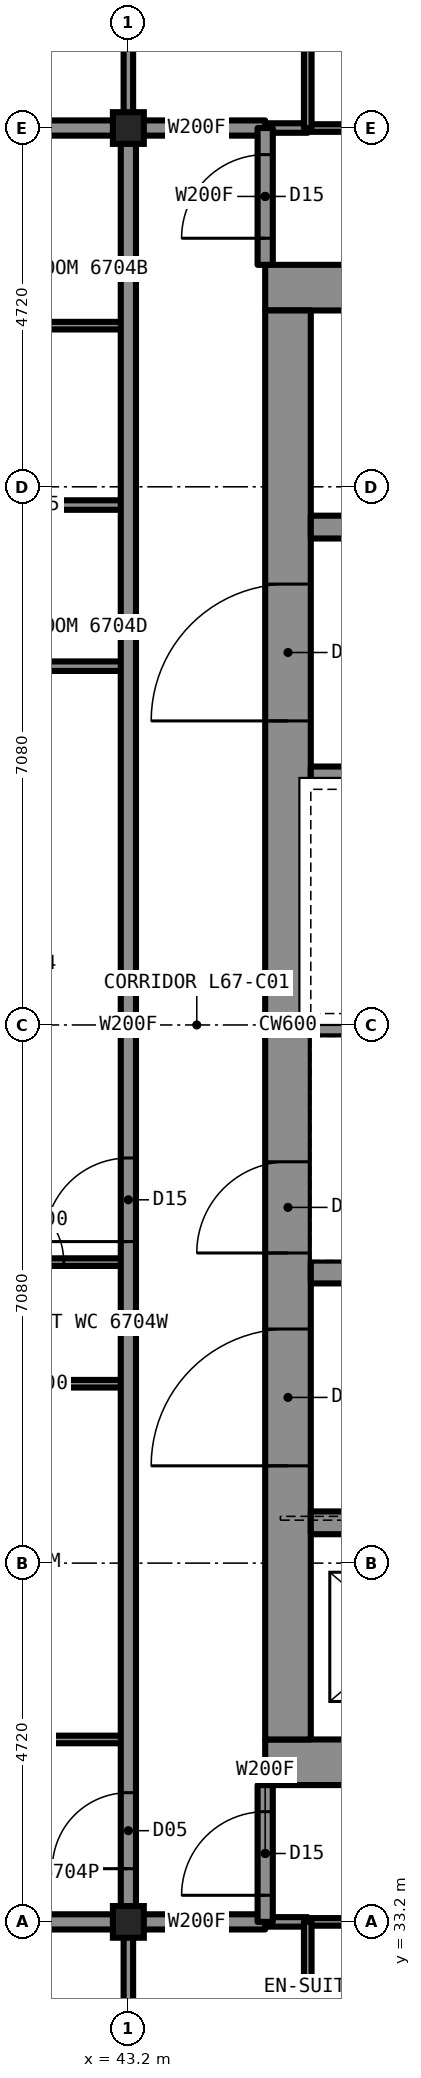
"""IFC4 building model, lengths in metres.
Left out: names, types, materials, properties, quantities, classifications, styles, units other than length and angle.
Written with IfcOpenShell. Run it as: python <this file> out.ifc"""

import sys

from ifc_helpers import new_model, si_unit, direction, frame, frame_2d, origin, origin_2d, place, context, subcontext, project, spatial, rectangle, i_section, extrude, element, fill, save


model = new_model("IFC4")
c1 = context("Model", 3, precision=1e-05, world=origin(), true_north=direction((0.0, 1.0)))
c2 = subcontext(c1, "Body", "Model", "MODEL_VIEW")
j1 = project(units=[si_unit("LENGTHUNIT", "METRE"), si_unit("PLANEANGLEUNIT", "RADIAN")], contexts=[c1])
p1 = place(None, origin())
s1 = spatial("IfcSite", under=j1, at=p1, CompositionType="ELEMENT")
p2 = place(p1, origin())
s2 = spatial("IfcBuilding", under=s1, at=p2, CompositionType="ELEMENT")
p3 = place(p2, frame((0.0, 0.0, 247.7)))
s3 = spatial("IfcBuildingStorey", under=s2, at=p3, CompositionType="ELEMENT", Elevation=247.7)
for number, where, z_axis, x_axis in (
    (1, (43.2, 33.2, 0.0), (0.0, 0.0, 1.0), (1.0, 0.0, 0.0)),
    (2, (43.2, 56.8, 0.0), (0.0, 0.0, 1.0), (1.0, 0.0, 0.0)),
):
    element("IfcColumn", number, at=place(p3, frame(where, z_axis=z_axis, x_axis=x_axis)), inside=s3, PredefinedType="COLUMN", context=c2, shape_type="SweptSolid", body=[
        extrude(i_section(OverallWidth=0.406, OverallDepth=0.417, WebThickness=0.03, FlangeThickness=0.048, at=origin_2d()), origin(), (0.0, 0.0, 1.0), 3.5),
    ])
for number, where, z_axis, x_axis in (
    (3, (45.0, 54.7, 0.0), (0.0, 0.0, 1.0), (1.0, 0.0, 0.0)),
    (4, (45.0, 35.3, 0.0), (0.0, 0.0, 1.0), (1.0, 0.0, 0.0)),
):
    element("IfcWall", number, at=place(p3, frame(where, z_axis=z_axis, x_axis=x_axis)), inside=s3, PredefinedType="SHEAR", context=c2, shape_type="SweptSolid", body=[
        extrude(rectangle(XDim=20.0, YDim=0.6, at=frame_2d((10.0, 0.0))), origin(), (0.0, 0.0, 1.0), 3.5),
    ])
p4 = place(p3, frame((45.3, 35.6, 0.0), z_axis=(0.0, 0.0, 1.0), x_axis=(0.0, 1.0, 0.0)))
e5 = element("IfcWall", 5, at=p4, inside=s3, PredefinedType="SHEAR", context=c2, shape_type="SweptSolid", body=[
    extrude(rectangle(XDim=18.8, YDim=0.6, at=frame_2d((9.4, 0.0))), origin(), (0.0, 0.0, 1.0), 3.5),
])
p5 = place(p4, frame((13.4, 0.0, 0.0)))
e6 = element("IfcOpeningElement", 6, at=p5, cuts=e5, PredefinedType="OPENING", context=c2, shape_type="SweptSolid", body=[
    extrude(rectangle(XDim=1.8, YDim=2.2, at=frame_2d((0.9, 1.1))), frame((0.0, 0.31, 0.0), z_axis=(0.0, -1.0, 0.0), x_axis=(1.0, 0.0, 0.0)), (0.0, 0.0, 1.0), 0.62),
])
p6 = place(p4, frame((3.6, 0.0, 0.0)))
e7 = element("IfcOpeningElement", 7, at=p6, cuts=e5, PredefinedType="OPENING", context=c2, shape_type="SweptSolid", body=[
    extrude(rectangle(XDim=1.8, YDim=2.2, at=frame_2d((0.9, 1.1))), frame((0.0, 0.31, 0.0), z_axis=(0.0, -1.0, 0.0), x_axis=(1.0, 0.0, 0.0)), (0.0, 0.0, 1.0), 0.62),
])
p7 = place(p4, frame((6.4, 0.0, 0.0)))
e8 = element("IfcOpeningElement", 8, at=p7, cuts=e5, PredefinedType="OPENING", context=c2, shape_type="SweptSolid", body=[
    extrude(rectangle(XDim=1.2, YDim=2.2, at=frame_2d((0.6, 1.1))), frame((0.0, 0.31, 0.0), z_axis=(0.0, -1.0, 0.0), x_axis=(1.0, 0.0, 0.0)), (0.0, 0.0, 1.0), 0.62),
])
p8 = place(p3, frame((45.6, 51.55, 0.0), z_axis=(0.0, 0.0, 1.0), x_axis=(1.0, 0.0, 0.0)))
e9 = element("IfcWall", 9, at=p8, inside=s3, PredefinedType="SHEAR", context=c2, shape_type="SweptSolid", body=[
    extrude(rectangle(XDim=18.8, YDim=0.3, at=frame_2d((9.4, 0.0))), origin(), (0.0, 0.0, 1.0), 3.5),
])
p9 = place(p8, frame((4.8, 0.0, 0.0)))
e10 = element("IfcOpeningElement", 10, at=p9, cuts=e9, PredefinedType="OPENING", context=c2, shape_type="SweptSolid", body=[
    extrude(rectangle(XDim=1.0, YDim=2.1, at=frame_2d((0.5, 1.05))), frame((0.0, 0.16, 0.0), z_axis=(0.0, -1.0, 0.0), x_axis=(1.0, 0.0, 0.0)), (0.0, 0.0, 1.0), 0.32),
])
p10 = place(p8, frame((11.6, 0.0, 0.0)))
e11 = element("IfcOpeningElement", 11, at=p10, cuts=e9, PredefinedType="OPENING", context=c2, shape_type="SweptSolid", body=[
    extrude(rectangle(XDim=1.1, YDim=2.2, at=frame_2d((0.55, 1.1))), frame((0.0, 0.16, 0.0), z_axis=(0.0, -1.0, 0.0), x_axis=(1.0, 0.0, 0.0)), (0.0, 0.0, 1.0), 0.32),
])
p11 = place(p8, frame((14.3, 0.0, 0.0)))
e12 = element("IfcOpeningElement", 12, at=p11, cuts=e9, PredefinedType="OPENING", context=c2, shape_type="SweptSolid", body=[
    extrude(rectangle(XDim=1.1, YDim=2.2, at=frame_2d((0.55, 1.1))), frame((0.0, 0.16, 0.0), z_axis=(0.0, -1.0, 0.0), x_axis=(1.0, 0.0, 0.0)), (0.0, 0.0, 1.0), 0.32),
])
p12 = place(p3, frame((45.6, 38.45, 0.0), z_axis=(0.0, 0.0, 1.0), x_axis=(1.0, 0.0, 0.0)))
e13 = element("IfcWall", 13, at=p12, inside=s3, PredefinedType="SHEAR", context=c2, shape_type="SweptSolid", body=[
    extrude(rectangle(XDim=18.8, YDim=0.3, at=frame_2d((9.4, 0.0))), origin(), (0.0, 0.0, 1.0), 3.5),
])
p13 = place(p12, frame((0.7, 0.0, 0.0)))
e14 = element("IfcOpeningElement", 14, at=p13, cuts=e13, PredefinedType="OPENING", context=c2, shape_type="SweptSolid", body=[
    extrude(rectangle(XDim=1.1, YDim=2.2, at=frame_2d((0.55, 1.1))), frame((0.0, 0.16, 0.0), z_axis=(0.0, -1.0, 0.0), x_axis=(1.0, 0.0, 0.0)), (0.0, 0.0, 1.0), 0.32),
])
p14 = place(p12, frame((3.4, 0.0, 0.0)))
e15 = element("IfcOpeningElement", 15, at=p14, cuts=e13, PredefinedType="OPENING", context=c2, shape_type="SweptSolid", body=[
    extrude(rectangle(XDim=1.1, YDim=2.2, at=frame_2d((0.55, 1.1))), frame((0.0, 0.16, 0.0), z_axis=(0.0, -1.0, 0.0), x_axis=(1.0, 0.0, 0.0)), (0.0, 0.0, 1.0), 0.32),
])
p15 = place(p12, frame((6.1, 0.0, 0.0)))
e16 = element("IfcOpeningElement", 16, at=p15, cuts=e13, PredefinedType="OPENING", context=c2, shape_type="SweptSolid", body=[
    extrude(rectangle(XDim=1.1, YDim=2.2, at=frame_2d((0.55, 1.1))), frame((0.0, 0.16, 0.0), z_axis=(0.0, -1.0, 0.0), x_axis=(1.0, 0.0, 0.0)), (0.0, 0.0, 1.0), 0.32),
])
p16 = place(p12, frame((8.8, 0.0, 0.0)))
e17 = element("IfcOpeningElement", 17, at=p16, cuts=e13, PredefinedType="OPENING", context=c2, shape_type="SweptSolid", body=[
    extrude(rectangle(XDim=1.1, YDim=2.2, at=frame_2d((0.55, 1.1))), frame((0.0, 0.16, 0.0), z_axis=(0.0, -1.0, 0.0), x_axis=(1.0, 0.0, 0.0)), (0.0, 0.0, 1.0), 0.32),
])
for number, where, z_axis, x_axis in (
    (18, (45.6, 48.25, 0.0), (0.0, 0.0, 1.0), (1.0, 0.0, 0.0)),
    (19, (45.6, 41.75, 0.0), (0.0, 0.0, 1.0), (1.0, 0.0, 0.0)),
):
    element("IfcWall", number, at=place(p3, frame(where, z_axis=z_axis, x_axis=x_axis)), inside=s3, PredefinedType="SHEAR", context=c2, shape_type="SweptSolid", body=[
        extrude(rectangle(XDim=7.1, YDim=0.3, at=frame_2d((3.55, 0.0))), origin(), (0.0, 0.0, 1.0), 3.5),
    ])
p17 = place(p3, frame((45.6, 45.0, 0.0), z_axis=(0.0, 0.0, 1.0), x_axis=(1.0, 0.0, 0.0)))
e20 = element("IfcWall", 20, at=p17, inside=s3, PredefinedType="SHEAR", context=c2, shape_type="SweptSolid", body=[
    extrude(rectangle(XDim=6.8, YDim=0.3, at=frame_2d((3.4, 0.0))), origin(), (0.0, 0.0, 1.0), 3.5),
])
p18 = place(p3, frame((45.56, 33.2, 0.0), z_axis=(0.0, 0.0, 1.0), x_axis=(1.0, 0.0, 0.0)))
e21 = element("IfcWall", 21, at=p18, inside=s3, PredefinedType="PARTITIONING", context=c2, shape_type="SweptSolid", body=[
    extrude(rectangle(XDim=2.36, YDim=0.1, at=frame_2d((1.18, 0.0))), origin(), (0.0, 0.0, 1.0), 3.33),
])
p19 = place(p3, frame((43.2, 33.2, 0.0), z_axis=(0.0, 0.0, 1.0), x_axis=(1.0, 0.0, 0.0)))
e22 = element("IfcWall", 22, at=p19, inside=s3, PredefinedType="PARTITIONING", context=c2, shape_type="SweptSolid", body=[
    extrude(rectangle(XDim=1.8, YDim=0.2, at=frame_2d((0.9, 0.0))), origin(), (0.0, 0.0, 1.0), 3.33),
])
p20 = place(p3, frame((37.3, 33.2, 0.0), z_axis=(0.0, 0.0, 1.0), x_axis=(1.0, 0.0, 0.0)))
e23 = element("IfcWall", 23, at=p20, inside=s3, PredefinedType="PARTITIONING", context=c2, shape_type="SweptSolid", body=[
    extrude(rectangle(XDim=5.9, YDim=0.2, at=frame_2d((2.95, 0.0))), origin(), (0.0, 0.0, 1.0), 2.573),
])
p21 = place(p3, frame((45.0, 33.2, 0.0), z_axis=(0.0, 0.0, 1.0), x_axis=(1.0, 0.0, 0.0)))
e24 = element("IfcWall", 24, at=p21, inside=s3, PredefinedType="PARTITIONING", context=c2, shape_type="SweptSolid", body=[
    extrude(rectangle(XDim=0.56, YDim=0.125, at=frame_2d((0.28, 0.0))), origin(), (0.0, 0.0, 1.0), 3.33),
])
p22 = place(p3, frame((41.0, 41.88, 0.0), z_axis=(0.0, 0.0, 1.0), x_axis=(1.0, 0.0, 0.0)))
e25 = element("IfcWall", 25, at=p22, inside=s3, PredefinedType="PARTITIONING", context=c2, shape_type="SweptSolid", body=[
    extrude(rectangle(XDim=2.2, YDim=0.1, at=frame_2d((1.1, 0.0))), origin(), (0.0, 0.0, 1.0), 3.33),
])
p23 = place(p22, frame((0.45, 0.0, 0.0)))
e26 = element("IfcOpeningElement", 26, at=p23, cuts=e25, PredefinedType="OPENING", context=c2, shape_type="SweptSolid", body=[
    extrude(rectangle(XDim=0.9, YDim=2.1, at=frame_2d((0.45, 1.05))), frame((0.0, 0.06, 0.0), z_axis=(0.0, -1.0, 0.0), x_axis=(1.0, 0.0, 0.0)), (0.0, 0.0, 1.0), 0.12),
])
p24 = place(p3, frame((41.0, 40.28, 0.0), z_axis=(0.0, 0.0, 1.0), x_axis=(1.0, 0.0, 0.0)))
e27 = element("IfcWall", 27, at=p24, inside=s3, PredefinedType="PARTITIONING", context=c2, shape_type="SweptSolid", body=[
    extrude(rectangle(XDim=2.2, YDim=0.1, at=frame_2d((1.1, 0.0))), origin(), (0.0, 0.0, 1.0), 2.797),
])
p25 = place(p3, frame((40.6, 35.6, 0.0), z_axis=(0.0, 0.0, 1.0), x_axis=(1.0, 0.0, 0.0)))
e28 = element("IfcWall", 28, at=p25, inside=s3, PredefinedType="PARTITIONING", context=c2, shape_type="SweptSolid", body=[
    extrude(rectangle(XDim=2.6, YDim=0.1, at=frame_2d((1.3, 0.0))), origin(), (0.0, 0.0, 1.0), 2.797),
])
p26 = place(p3, frame((45.56, 56.8, 0.0), z_axis=(0.0, 0.0, 1.0), x_axis=(1.0, 0.0, 0.0)))
e29 = element("IfcWall", 29, at=p26, inside=s3, PredefinedType="PARTITIONING", context=c2, shape_type="SweptSolid", body=[
    extrude(rectangle(XDim=2.36, YDim=0.1, at=frame_2d((1.18, 0.0))), origin(), (0.0, 0.0, 1.0), 3.33),
])
p27 = place(p3, frame((43.2, 56.8, 0.0), z_axis=(0.0, 0.0, 1.0), x_axis=(1.0, 0.0, 0.0)))
e30 = element("IfcWall", 30, at=p27, inside=s3, PredefinedType="PARTITIONING", context=c2, shape_type="SweptSolid", body=[
    extrude(rectangle(XDim=1.8, YDim=0.2, at=frame_2d((0.9, 0.0))), origin(), (0.0, 0.0, 1.0), 3.33),
])
p28 = place(p3, frame((37.3, 56.8, 0.0), z_axis=(0.0, 0.0, 1.0), x_axis=(1.0, 0.0, 0.0)))
e31 = element("IfcWall", 31, at=p28, inside=s3, PredefinedType="PARTITIONING", context=c2, shape_type="SweptSolid", body=[
    extrude(rectangle(XDim=5.9, YDim=0.2, at=frame_2d((2.95, 0.0))), origin(), (0.0, 0.0, 1.0), 2.573),
])
p29 = place(p3, frame((45.0, 56.8, 0.0), z_axis=(0.0, 0.0, 1.0), x_axis=(1.0, 0.0, 0.0)))
e32 = element("IfcWall", 32, at=p29, inside=s3, PredefinedType="PARTITIONING", context=c2, shape_type="SweptSolid", body=[
    extrude(rectangle(XDim=0.56, YDim=0.125, at=frame_2d((0.28, 0.0))), origin(), (0.0, 0.0, 1.0), 3.33),
])
p30 = place(p3, frame((37.3, 49.72, 0.0), z_axis=(0.0, 0.0, 1.0), x_axis=(1.0, 0.0, 0.0)))
e33 = element("IfcWall", 33, at=p30, inside=s3, PredefinedType="PARTITIONING", context=c2, shape_type="SweptSolid", body=[
    extrude(rectangle(XDim=5.9, YDim=0.125, at=frame_2d((2.95, 0.0))), origin(), (0.0, 0.0, 1.0), 2.797),
])
p31 = place(p30, frame((1.45, 0.0, 0.0)))
e34 = element("IfcOpeningElement", 34, at=p31, cuts=e33, PredefinedType="OPENING", context=c2, shape_type="SweptSolid", body=[
    extrude(rectangle(XDim=0.9, YDim=2.2, at=frame_2d((0.45, 1.1))), frame((0.0, 0.073, 0.0), z_axis=(0.0, -1.0, 0.0), x_axis=(1.0, 0.0, 0.0)), (0.0, 0.0, 1.0), 0.145),
])
p32 = place(p3, frame((40.8, 51.84, 0.0), z_axis=(0.0, 0.0, 1.0), x_axis=(1.0, 0.0, 0.0)))
e35 = element("IfcWall", 35, at=p32, inside=s3, PredefinedType="PARTITIONING", context=c2, shape_type="SweptSolid", body=[
    extrude(rectangle(XDim=2.4, YDim=0.125, at=frame_2d((1.2, 0.0))), origin(), (0.0, 0.0, 1.0), 3.33),
])
p33 = place(p3, frame((40.2, 54.2, 0.0), z_axis=(0.0, 0.0, 1.0), x_axis=(1.0, 0.0, 0.0)))
e36 = element("IfcWall", 36, at=p33, inside=s3, PredefinedType="PARTITIONING", context=c2, shape_type="SweptSolid", body=[
    extrude(rectangle(XDim=3.0, YDim=0.1, at=frame_2d((1.5, 0.0))), origin(), (0.0, 0.0, 1.0), 3.33),
])
p34 = place(p3, frame((45.0, 33.2, 0.0), z_axis=(0.0, 0.0, 1.0), x_axis=(0.0, 1.0, 0.0)))
e37 = element("IfcWall", 37, at=p34, inside=s3, PredefinedType="PARTITIONING", context=c2, shape_type="SweptSolid", body=[
    extrude(rectangle(XDim=1.8, YDim=0.2, at=frame_2d((0.9, 0.0))), origin(), (0.0, 0.0, 1.0), 3.33),
])
p35 = place(p34, frame((0.35, 0.0, 0.0)))
e38 = element("IfcOpeningElement", 38, at=p35, cuts=e37, PredefinedType="OPENING", context=c2, shape_type="SweptSolid", body=[
    extrude(rectangle(XDim=1.1, YDim=2.2, at=frame_2d((0.55, 1.1))), frame((0.0, 0.11, 0.0), z_axis=(0.0, -1.0, 0.0), x_axis=(1.0, 0.0, 0.0)), (0.0, 0.0, 1.0), 0.22),
])
p36 = place(p3, frame((45.0, 55.0, 0.0), z_axis=(0.0, 0.0, 1.0), x_axis=(0.0, 1.0, 0.0)))
e39 = element("IfcWall", 39, at=p36, inside=s3, PredefinedType="PARTITIONING", context=c2, shape_type="SweptSolid", body=[
    extrude(rectangle(XDim=1.8, YDim=0.2, at=frame_2d((0.9, 0.0))), origin(), (0.0, 0.0, 1.0), 3.33),
])
p37 = place(p36, frame((0.35, 0.0, 0.0)))
e40 = element("IfcOpeningElement", 40, at=p37, cuts=e39, PredefinedType="OPENING", context=c2, shape_type="SweptSolid", body=[
    extrude(rectangle(XDim=1.1, YDim=2.2, at=frame_2d((0.55, 1.1))), frame((0.0, 0.11, 0.0), z_axis=(0.0, -1.0, 0.0), x_axis=(1.0, 0.0, 0.0)), (0.0, 0.0, 1.0), 0.22),
])
p38 = place(p3, frame((43.2, 33.2, 0.0), z_axis=(0.0, 0.0, 1.0), x_axis=(0.0, 1.0, 0.0)))
e41 = element("IfcWall", 41, at=p38, inside=s3, PredefinedType="PARTITIONING", context=c2, shape_type="SweptSolid", body=[
    extrude(rectangle(XDim=23.6, YDim=0.2, at=frame_2d((11.8, 0.0))), origin(), (0.0, 0.0, 1.0), 3.33),
])
p39 = place(p38, frame((8.95, 0.0, 0.0)))
e42 = element("IfcOpeningElement", 42, at=p39, cuts=e41, PredefinedType="OPENING", context=c2, shape_type="SweptSolid", body=[
    extrude(rectangle(XDim=1.1, YDim=2.2, at=frame_2d((0.55, 1.1))), frame((0.0, 0.11, 0.0), z_axis=(0.0, -1.0, 0.0), x_axis=(1.0, 0.0, 0.0)), (0.0, 0.0, 1.0), 0.22),
])
p40 = place(p38, frame((0.7, 0.0, 0.0)))
e43 = element("IfcOpeningElement", 43, at=p40, cuts=e41, PredefinedType="OPENING", context=c2, shape_type="SweptSolid", body=[
    extrude(rectangle(XDim=1.0, YDim=2.1, at=frame_2d((0.5, 1.05))), frame((0.0, 0.11, 0.0), z_axis=(0.0, -1.0, 0.0), x_axis=(1.0, 0.0, 0.0)), (0.0, 0.0, 1.0), 0.22),
])
p41 = place(p3, frame((43.2, 27.3, 0.0), z_axis=(0.0, 0.0, 1.0), x_axis=(0.0, 1.0, 0.0)))
e44 = element("IfcWall", 44, at=p41, inside=s3, PredefinedType="PARTITIONING", context=c2, shape_type="SweptSolid", body=[
    extrude(rectangle(XDim=5.9, YDim=0.125, at=frame_2d((2.95, 0.0))), origin(), (0.0, 0.0, 1.0), 2.573),
])
p42 = place(p41, frame((1.45, 0.0, 0.0)))
e45 = element("IfcOpeningElement", 45, at=p42, cuts=e44, PredefinedType="OPENING", context=c2, shape_type="SweptSolid", body=[
    extrude(rectangle(XDim=0.9, YDim=2.2, at=frame_2d((0.45, 1.1))), frame((0.0, 0.073, 0.0), z_axis=(0.0, -1.0, 0.0), x_axis=(1.0, 0.0, 0.0)), (0.0, 0.0, 1.0), 0.145),
])
p43 = place(p3, frame((43.2, 56.8, 0.0), z_axis=(0.0, 0.0, 1.0), x_axis=(0.0, 1.0, 0.0)))
e46 = element("IfcWall", 46, at=p43, inside=s3, PredefinedType="PARTITIONING", context=c2, shape_type="SweptSolid", body=[
    extrude(rectangle(XDim=5.9, YDim=0.125, at=frame_2d((2.95, 0.0))), origin(), (0.0, 0.0, 1.0), 2.573),
])
p44 = place(p43, frame((3.55, 0.0, 0.0)))
e47 = element("IfcOpeningElement", 47, at=p44, cuts=e46, PredefinedType="OPENING", context=c2, shape_type="SweptSolid", body=[
    extrude(rectangle(XDim=0.9, YDim=2.2, at=frame_2d((0.45, 1.1))), frame((0.0, 0.073, 0.0), z_axis=(0.0, -1.0, 0.0), x_axis=(1.0, 0.0, 0.0)), (0.0, 0.0, 1.0), 0.145),
])
for number, where, z_axis, x_axis in (
    (48, (45.56, 30.4, 0.0), (0.0, 0.0, 1.0), (0.0, 1.0, 0.0)),
    (49, (45.56, 56.8, 0.0), (0.0, 0.0, 1.0), (0.0, 1.0, 0.0)),
):
    element("IfcWall", number, at=place(p3, frame(where, z_axis=z_axis, x_axis=x_axis)), inside=s3, PredefinedType="PARTITIONING", context=c2, shape_type="SweptSolid", body=[
        extrude(rectangle(XDim=2.8, YDim=0.1, at=frame_2d((1.4, 0.0))), origin(), (0.0, 0.0, 1.0), 3.33),
    ])
p45 = place(p37, origin())
e50 = element("IfcDoor", 50, at=p45, inside=s3, OperationType="SINGLE_SWING_LEFT", PredefinedType="DOOR", context=c2, shape_type="SweptSolid", body=[
    extrude(rectangle(XDim=1.1, YDim=2.2, at=frame_2d((0.55, 1.1))), frame((0.0, 0.025, 0.0), z_axis=(0.0, -1.0, 0.0), x_axis=(1.0, 0.0, 0.0)), (0.0, 0.0, 1.0), 0.05),
])
fill(e40, e50)
p46 = place(p35, origin())
e51 = element("IfcDoor", 51, at=p46, inside=s3, OperationType="SINGLE_SWING_LEFT", PredefinedType="DOOR", context=c2, shape_type="SweptSolid", body=[
    extrude(rectangle(XDim=1.1, YDim=2.2, at=frame_2d((0.55, 1.1))), frame((0.0, 0.025, 0.0), z_axis=(0.0, -1.0, 0.0), x_axis=(1.0, 0.0, 0.0)), (0.0, 0.0, 1.0), 0.05),
])
fill(e38, e51)
p47 = place(p39, origin())
e52 = element("IfcDoor", 52, at=p47, inside=s3, OperationType="SINGLE_SWING_LEFT", PredefinedType="DOOR", context=c2, shape_type="SweptSolid", body=[
    extrude(rectangle(XDim=1.1, YDim=2.2, at=frame_2d((0.55, 1.1))), frame((0.0, 0.025, 0.0), z_axis=(0.0, -1.0, 0.0), x_axis=(1.0, 0.0, 0.0)), (0.0, 0.0, 1.0), 0.05),
])
fill(e42, e52)
p48 = place(p40, origin())
e53 = element("IfcDoor", 53, at=p48, inside=s3, OperationType="SINGLE_SWING_LEFT", PredefinedType="DOOR", context=c2, shape_type="SweptSolid", body=[
    extrude(rectangle(XDim=1.0, YDim=2.1, at=frame_2d((0.5, 1.05))), frame((0.0, 0.025, 0.0), z_axis=(0.0, -1.0, 0.0), x_axis=(1.0, 0.0, 0.0)), (0.0, 0.0, 1.0), 0.05),
])
fill(e43, e53)
p49 = place(p23, origin())
e54 = element("IfcDoor", 54, at=p49, inside=s3, OperationType="SINGLE_SWING_LEFT", PredefinedType="DOOR", context=c2, shape_type="SweptSolid", body=[
    extrude(rectangle(XDim=0.9, YDim=2.1, at=frame_2d((0.45, 1.05))), frame((0.0, 0.025, 0.0), z_axis=(0.0, -1.0, 0.0), x_axis=(1.0, 0.0, 0.0)), (0.0, 0.0, 1.0), 0.05),
])
fill(e26, e54)
p50 = place(p5, origin())
e55 = element("IfcDoor", 55, at=p50, inside=s3, OperationType="DOUBLE_DOOR_SINGLE_SWING", PredefinedType="DOOR", context=c2, shape_type="SweptSolid", body=[
    extrude(rectangle(XDim=1.8, YDim=2.2, at=frame_2d((0.9, 1.1))), frame((0.0, 0.025, 0.0), z_axis=(0.0, -1.0, 0.0), x_axis=(1.0, 0.0, 0.0)), (0.0, 0.0, 1.0), 0.05),
])
fill(e6, e55)
p51 = place(p6, origin())
e56 = element("IfcDoor", 56, at=p51, inside=s3, OperationType="DOUBLE_DOOR_SINGLE_SWING", PredefinedType="DOOR", context=c2, shape_type="SweptSolid", body=[
    extrude(rectangle(XDim=1.8, YDim=2.2, at=frame_2d((0.9, 1.1))), frame((0.0, 0.025, 0.0), z_axis=(0.0, -1.0, 0.0), x_axis=(1.0, 0.0, 0.0)), (0.0, 0.0, 1.0), 0.05),
])
fill(e7, e56)
p52 = place(p7, origin())
e57 = element("IfcDoor", 57, at=p52, inside=s3, OperationType="SINGLE_SWING_LEFT", PredefinedType="DOOR", context=c2, shape_type="SweptSolid", body=[
    extrude(rectangle(XDim=1.2, YDim=2.2, at=frame_2d((0.6, 1.1))), frame((0.0, 0.025, 0.0), z_axis=(0.0, -1.0, 0.0), x_axis=(1.0, 0.0, 0.0)), (0.0, 0.0, 1.0), 0.05),
])
fill(e8, e57)
save(model, sys.argv[1])
